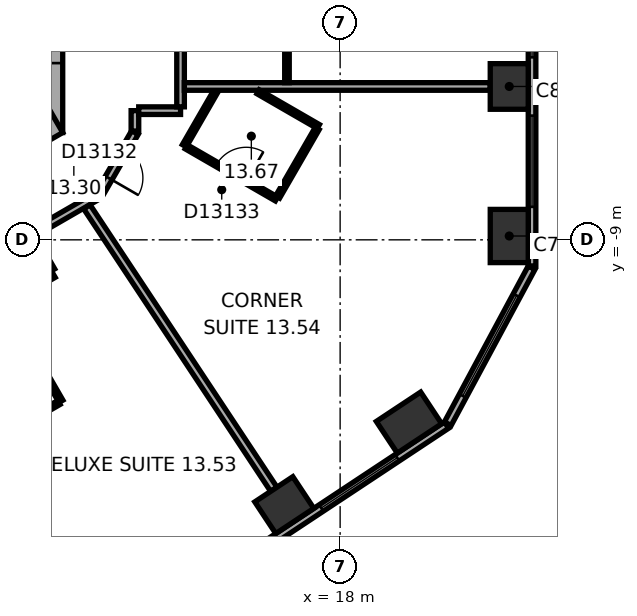
"""IFC4 building model, lengths in metres.
Left out: names, types, materials, properties, quantities, classifications, styles, units other than length and angle.
Written with IfcOpenShell. Run it as: python <this file> out.ifc"""

import sys

from ifc_helpers import new_model, si_unit, direction, frame, frame_2d, origin, origin_2d, place, context, subcontext, project, spatial, rectangle, extrude, element, fill, save


model = new_model("IFC4")
c1 = context("Model", 3, precision=1e-05, world=origin(), true_north=direction((0.0, 1.0)))
c2 = subcontext(c1, "Body", "Model", "MODEL_VIEW")
j1 = project(units=[si_unit("LENGTHUNIT", "METRE"), si_unit("PLANEANGLEUNIT", "RADIAN")], contexts=[c1])
p1 = place(None, origin())
s1 = spatial("IfcSite", under=j1, at=p1, CompositionType="ELEMENT")
p2 = place(p1, origin())
s2 = spatial("IfcBuilding", under=s1, at=p2, CompositionType="ELEMENT")
p3 = place(p2, frame((0.0, 0.0, 63.8)))
s3 = spatial("IfcBuildingStorey", under=s2, at=p3, CompositionType="ELEMENT", Elevation=63.8)
p4 = place(p3, frame((22.45, -8.899, 0.0), z_axis=(0.0, 0.0, 1.0), x_axis=(0.0, 1.0, 0.0)))
e1 = element("IfcColumn", 1, at=p4, inside=s3, PredefinedType="COLUMN", context=c2, shape_type="SweptSolid", body=[
    extrude(rectangle(XDim=1.4, YDim=1.0, at=origin_2d()), origin(), (0.0, 0.0, 1.0), 3.3),
])
for number, where, z_axis, x_axis in (
    (2, (22.45, -4.965, 0.0), (0.0, 0.0, 1.0), (0.0, 1.0, 0.0)),
    (3, (16.531, -15.981, 0.0), (0.0, 0.0, 1.0), (0.834, 0.552, 0.0)),
):
    element("IfcColumn", number, at=place(p3, frame(where, z_axis=z_axis, x_axis=x_axis)), inside=s3, PredefinedType="COLUMN", context=c2, shape_type="SweptSolid", body=[
        extrude(rectangle(XDim=1.2, YDim=1.0, at=origin_2d()), origin(), (0.0, 0.0, 1.0), 3.3),
    ])
p5 = place(p3, frame((19.812, -13.809, 0.0), z_axis=(0.0, 0.0, 1.0), x_axis=(0.833885822067, 0.551936985312, 0.0)))
e4 = element("IfcColumn", 4, at=p5, inside=s3, PredefinedType="COLUMN", context=c2, shape_type="SweptSolid", body=[
    extrude(rectangle(XDim=1.4, YDim=1.0, at=origin_2d()), origin(), (0.0, 0.0, 1.0), 3.3),
])
p6 = place(p3, frame((10.1, -6.177, 0.0), z_axis=(0.0, 0.0, 1.0), x_axis=(0.0, 1.0, 0.0)))
e5 = element("IfcWall", 5, at=p6, inside=s3, PredefinedType="SHEAR", context=c2, shape_type="SweptSolid", body=[
    extrude(rectangle(XDim=12.355, YDim=1.2, at=frame_2d((6.177, 0.0))), origin(), (0.0, 0.0, 1.0), 3.3),
])
p7 = place(p6, frame((6.378, 0.0, 0.0)))
e6 = element("IfcOpeningElement", 6, at=p7, cuts=e5, PredefinedType="OPENING", context=c2, shape_type="SweptSolid", body=[
    extrude(rectangle(XDim=1.5, YDim=2.1, at=frame_2d((0.75, 1.05))), frame((0.0, 0.61, 0.0), z_axis=(0.0, -1.0, 0.0), x_axis=(1.0, 0.0, 0.0)), (0.0, 0.0, 1.0), 1.22),
])
p8 = place(p6, frame((1.828, 0.0, 0.0)))
e7 = element("IfcOpeningElement", 7, at=p8, cuts=e5, PredefinedType="OPENING", context=c2, shape_type="SweptSolid", body=[
    extrude(rectangle(XDim=1.1, YDim=2.1, at=frame_2d((0.55, 1.05))), frame((0.0, 0.61, 0.0), z_axis=(0.0, -1.0, 0.0), x_axis=(1.0, 0.0, 0.0)), (0.0, 0.0, 1.0), 1.22),
])
p9 = place(p6, frame((4.427, 0.0, 0.0)))
e8 = element("IfcOpeningElement", 8, at=p9, cuts=e5, PredefinedType="OPENING", context=c2, shape_type="SweptSolid", body=[
    extrude(rectangle(XDim=1.1, YDim=2.1, at=frame_2d((0.55, 1.05))), frame((0.0, 0.61, 0.0), z_axis=(0.0, -1.0, 0.0), x_axis=(1.0, 0.0, 0.0)), (0.0, 0.0, 1.0), 1.22),
])
p10 = place(p3, frame((-0.3, -11.836, 0.0), z_axis=(0.0, 0.0, 1.0), x_axis=(0.866021384402, 0.500006961711, 0.0)))
e9 = element("IfcWall", 9, at=p10, inside=s3, PredefinedType="SHEAR", context=c2, shape_type="SweptSolid", body=[
    extrude(rectangle(XDim=12.355, YDim=1.2, at=frame_2d((6.178, 0.0))), origin(), (0.0, 0.0, 1.0), 3.3),
])
p11 = place(p10, frame((4.128, 0.0, 0.0)))
e10 = element("IfcOpeningElement", 10, at=p11, cuts=e9, PredefinedType="OPENING", context=c2, shape_type="SweptSolid", body=[
    extrude(rectangle(XDim=0.9, YDim=2.1, at=frame_2d((0.45, 1.05))), frame((0.0, 0.61, 0.0), z_axis=(0.0, -1.0, 0.0), x_axis=(1.0, 0.0, 0.0)), (0.0, 0.0, 1.0), 1.22),
])
p12 = place(p10, frame((7.928, 0.0, 0.0)))
e11 = element("IfcOpeningElement", 11, at=p12, cuts=e9, PredefinedType="OPENING", context=c2, shape_type="SweptSolid", body=[
    extrude(rectangle(XDim=1.1, YDim=2.1, at=frame_2d((0.55, 1.05))), frame((0.0, 0.61, 0.0), z_axis=(0.0, -1.0, 0.0), x_axis=(1.0, 0.0, 0.0)), (0.0, 0.0, 1.0), 1.22),
])
p13 = place(p3, frame((23.05, -9.687, 0.0), z_axis=(0.0, 0.0, 1.0), x_axis=(0.0, 1.0, 0.0)))
e12 = element("IfcWall", 12, at=p13, inside=s3, PredefinedType="STANDARD", context=c2, shape_type="SweptSolid", body=[
    extrude(rectangle(XDim=21.246, YDim=0.2, at=frame_2d((10.623, 0.0))), origin(), (0.0, 0.0, 1.0), 3.3),
])
p14 = place(p13, frame((1.555, 0.0, 0.8)))
e13 = element("IfcOpeningElement", 13, at=p14, cuts=e12, PredefinedType="OPENING", context=c2, shape_type="SweptSolid", body=[
    extrude(rectangle(XDim=2.4, YDim=1.7, at=frame_2d((1.2, 0.85))), frame((0.0, 0.11, 0.0), z_axis=(0.0, -1.0, 0.0), x_axis=(1.0, 0.0, 0.0)), (0.0, 0.0, 1.0), 0.22),
])
p15 = place(p13, frame((5.489, 0.0, 0.8)))
e14 = element("IfcOpeningElement", 14, at=p15, cuts=e12, PredefinedType="OPENING", context=c2, shape_type="SweptSolid", body=[
    extrude(rectangle(XDim=2.4, YDim=1.7, at=frame_2d((1.2, 0.85))), frame((0.0, 0.11, 0.0), z_axis=(0.0, -1.0, 0.0), x_axis=(1.0, 0.0, 0.0)), (0.0, 0.0, 1.0), 0.22),
])
p16 = place(p13, frame((9.424, 0.0, 0.8)))
e15 = element("IfcOpeningElement", 15, at=p16, cuts=e12, PredefinedType="OPENING", context=c2, shape_type="SweptSolid", body=[
    extrude(rectangle(XDim=2.4, YDim=1.7, at=frame_2d((1.2, 0.85))), frame((0.0, 0.11, 0.0), z_axis=(0.0, -1.0, 0.0), x_axis=(1.0, 0.0, 0.0)), (0.0, 0.0, 1.0), 0.22),
])
p17 = place(p13, frame((13.358, 0.0, 0.8)))
e16 = element("IfcOpeningElement", 16, at=p17, cuts=e12, PredefinedType="OPENING", context=c2, shape_type="SweptSolid", body=[
    extrude(rectangle(XDim=2.4, YDim=1.7, at=frame_2d((1.2, 0.85))), frame((0.0, 0.11, 0.0), z_axis=(0.0, -1.0, 0.0), x_axis=(1.0, 0.0, 0.0)), (0.0, 0.0, 1.0), 0.22),
])
p18 = place(p13, frame((17.293, 0.0, 0.8)))
e17 = element("IfcOpeningElement", 17, at=p18, cuts=e12, PredefinedType="OPENING", context=c2, shape_type="SweptSolid", body=[
    extrude(rectangle(XDim=2.4, YDim=1.7, at=frame_2d((1.2, 0.85))), frame((0.0, 0.11, 0.0), z_axis=(0.0, -1.0, 0.0), x_axis=(1.0, 0.0, 0.0)), (0.0, 0.0, 1.0), 0.22),
])
p19 = place(p3, frame((3.083, -25.601, 0.0), z_axis=(0.0, 0.0, 1.0), x_axis=(0.833884295743, 0.551939291329, 0.0)))
e18 = element("IfcWall", 18, at=p19, inside=s3, PredefinedType="STANDARD", context=c2, shape_type="SweptSolid", body=[
    extrude(rectangle(XDim=21.246, YDim=0.2, at=frame_2d((10.623, 0.0))), origin(), (0.0, 0.0, 1.0), 3.3),
])
p20 = place(p19, frame((1.553, 0.0, 0.8)))
e19 = element("IfcOpeningElement", 19, at=p20, cuts=e18, PredefinedType="OPENING", context=c2, shape_type="SweptSolid", body=[
    extrude(rectangle(XDim=2.4, YDim=1.7, at=frame_2d((1.2, 0.85))), frame((0.0, 0.11, 0.0), z_axis=(0.0, -1.0, 0.0), x_axis=(1.0, 0.0, 0.0)), (0.0, 0.0, 1.0), 0.22),
])
p21 = place(p19, frame((5.488, 0.0, 0.8)))
e20 = element("IfcOpeningElement", 20, at=p21, cuts=e18, PredefinedType="OPENING", context=c2, shape_type="SweptSolid", body=[
    extrude(rectangle(XDim=2.4, YDim=1.7, at=frame_2d((1.2, 0.85))), frame((0.0, 0.11, 0.0), z_axis=(0.0, -1.0, 0.0), x_axis=(1.0, 0.0, 0.0)), (0.0, 0.0, 1.0), 0.22),
])
p22 = place(p19, frame((9.422, 0.0, 0.8)))
e21 = element("IfcOpeningElement", 21, at=p22, cuts=e18, PredefinedType="OPENING", context=c2, shape_type="SweptSolid", body=[
    extrude(rectangle(XDim=2.4, YDim=1.7, at=frame_2d((1.2, 0.85))), frame((0.0, 0.11, 0.0), z_axis=(0.0, -1.0, 0.0), x_axis=(1.0, 0.0, 0.0)), (0.0, 0.0, 1.0), 0.22),
])
p23 = place(p19, frame((13.357, 0.0, 0.8)))
e22 = element("IfcOpeningElement", 22, at=p23, cuts=e18, PredefinedType="OPENING", context=c2, shape_type="SweptSolid", body=[
    extrude(rectangle(XDim=2.4, YDim=1.7, at=frame_2d((1.2, 0.85))), frame((0.0, 0.11, 0.0), z_axis=(0.0, -1.0, 0.0), x_axis=(1.0, 0.0, 0.0)), (0.0, 0.0, 1.0), 0.22),
])
p24 = place(p19, frame((17.291, 0.0, 0.8)))
e23 = element("IfcOpeningElement", 23, at=p24, cuts=e18, PredefinedType="OPENING", context=c2, shape_type="SweptSolid", body=[
    extrude(rectangle(XDim=2.4, YDim=1.7, at=frame_2d((1.2, 0.85))), frame((0.0, 0.11, 0.0), z_axis=(0.0, -1.0, 0.0), x_axis=(1.0, 0.0, 0.0)), (0.0, 0.0, 1.0), 0.22),
])
p25 = place(p3, frame((20.833, -13.839, 0.0), z_axis=(0.0, 0.0, 1.0), x_axis=(0.473321668581, 0.880889662813, 0.0)))
e24 = element("IfcWall", 24, at=p25, inside=s3, PredefinedType="STANDARD", context=c2, shape_type="SweptSolid", body=[
    extrude(rectangle(XDim=4.66, YDim=0.2, at=frame_2d((2.33, 0.0))), origin(), (0.0, 0.0, 1.0), 3.3),
])
p26 = place(p25, frame((0.83, 0.0, 0.8)))
e25 = element("IfcOpeningElement", 25, at=p26, cuts=e24, PredefinedType="OPENING", context=c2, shape_type="SweptSolid", body=[
    extrude(rectangle(XDim=3.0, YDim=1.7, at=frame_2d((1.5, 0.85))), frame((0.0, 0.11, 0.0), z_axis=(0.0, -1.0, 0.0), x_axis=(1.0, 0.0, 0.0)), (0.0, 0.0, 1.0), 0.22),
])
p27 = place(p3, frame((7.385, -11.673, 0.0), z_axis=(0.0, 0.0, 1.0), x_axis=(0.866037524642, 0.499979005472, 0.0)))
e26 = element("IfcWall", 26, at=p27, inside=s3, PredefinedType="PARTITIONING", context=c2, shape_type="SweptSolid", body=[
    extrude(rectangle(XDim=3.542, YDim=0.2, at=frame_2d((1.771, 0.0))), origin(), (0.0, 0.0, 1.0), 3.05),
])
p28 = place(p3, frame((9.203, -10.738, 0.0), z_axis=(0.0, 0.0, 1.0), x_axis=(0.50005036918, -0.865996321171, 0.0)))
e27 = element("IfcWall", 27, at=p28, inside=s3, PredefinedType="PARTITIONING", context=c2, shape_type="SweptSolid", body=[
    extrude(rectangle(XDim=2.9, YDim=0.12, at=frame_2d((1.45, 0.0))), origin(), (0.0, 0.0, 1.0), 3.05),
])
p29 = place(p3, frame((9.852, -8.861, 0.0), z_axis=(0.0, 0.0, 1.0), x_axis=(0.866013291437, 0.500020978615, 0.0)))
e28 = element("IfcWall", 28, at=p29, inside=s3, PredefinedType="PARTITIONING", context=c2, shape_type="SweptSolid", body=[
    extrude(rectangle(XDim=2.077, YDim=0.2, at=frame_2d((1.038, 0.0))), origin(), (0.0, 0.0, 1.0), 3.05),
])
p30 = place(p3, frame((10.402, -9.815, 0.0), z_axis=(0.0, 0.0, 1.0), x_axis=(-0.499968756647, 0.866043441391, 0.0)))
e29 = element("IfcWall", 29, at=p30, inside=s3, PredefinedType="PARTITIONING", context=c2, shape_type="SweptSolid", body=[
    extrude(rectangle(XDim=1.001, YDim=0.2, at=frame_2d((0.5, 0.0))), origin(), (0.0, 0.0, 1.0), 3.05),
])
p31 = place(p3, frame((10.601, -13.28, 0.0), z_axis=(0.0, 0.0, 1.0), x_axis=(-0.866044057189, -0.499967689963, 0.0)))
e30 = element("IfcWall", 30, at=p31, inside=s3, PredefinedType="PARTITIONING", context=c2, shape_type="SweptSolid", body=[
    extrude(rectangle(XDim=1.982, YDim=0.12, at=frame_2d((0.991, 0.0))), origin(), (0.0, 0.0, 1.0), 3.05),
])
p32 = place(p3, frame((11.67, -7.788, 0.0), z_axis=(0.0, 0.0, 1.0), x_axis=(0.500063286585, 0.865988862174, 0.0)))
e31 = element("IfcWall", 31, at=p32, inside=s3, PredefinedType="PARTITIONING", context=c2, shape_type="SweptSolid", body=[
    extrude(rectangle(XDim=1.86, YDim=0.2, at=frame_2d((0.93, 0.0))), origin(), (0.0, 0.0, 1.0), 3.05),
])
p33 = place(p32, frame((0.48, 0.0, 0.0)))
e32 = element("IfcOpeningElement", 32, at=p33, cuts=e31, PredefinedType="OPENING", context=c2, shape_type="SweptSolid", body=[
    extrude(rectangle(XDim=0.9, YDim=2.1, at=frame_2d((0.45, 1.05))), frame((0.0, 0.11, 0.0), z_axis=(0.0, -1.0, 0.0), x_axis=(1.0, 0.0, 0.0)), (0.0, 0.0, 1.0), 0.22),
])
p34 = place(p3, frame((12.6, -6.138, 0.0), z_axis=(0.0, 0.0, 1.0), x_axis=(0.0, 1.0, 0.0)))
e33 = element("IfcWall", 33, at=p34, inside=s3, PredefinedType="PARTITIONING", context=c2, shape_type="SweptSolid", body=[
    extrude(rectangle(XDim=0.537, YDim=0.2, at=frame_2d((0.268, 0.0))), origin(), (0.0, 0.0, 1.0), 3.05),
])
p35 = place(p3, frame((12.7, -5.601, 0.0), z_axis=(0.0, 0.0, 1.0), x_axis=(1.0, 0.0, 0.0)))
e34 = element("IfcWall", 34, at=p35, inside=s3, PredefinedType="PARTITIONING", context=c2, shape_type="SweptSolid", body=[
    extrude(rectangle(XDim=1.101, YDim=0.2, at=frame_2d((0.551, 0.0))), origin(), (0.0, 0.0, 1.0), 3.05),
])
p36 = place(p3, frame((13.801, -5.501, 0.0), z_axis=(0.0, 0.0, 1.0), x_axis=(0.0, 1.0, 0.0)))
e35 = element("IfcWall", 35, at=p36, inside=s3, PredefinedType="PARTITIONING", context=c2, shape_type="SweptSolid", body=[
    extrude(rectangle(XDim=5.702, YDim=0.2, at=frame_2d((2.851, 0.0))), origin(), (0.0, 0.0, 1.0), 3.05),
])
p37 = place(p3, frame((13.901, -6.524, 0.0), z_axis=(0.0, 0.0, 1.0), x_axis=(0.499964162598, 0.86604609353, 0.0)))
e36 = element("IfcWall", 36, at=p37, inside=s3, PredefinedType="PARTITIONING", context=c2, shape_type="SweptSolid", body=[
    extrude(rectangle(XDim=1.661, YDim=0.12, at=frame_2d((0.831, 0.0))), origin(), (0.0, 0.0, 1.0), 3.05),
])
p38 = place(p3, frame((13.901, -4.965, 0.0), z_axis=(0.0, 0.0, 1.0), x_axis=(1.0, 0.0, 0.0)))
e37 = element("IfcWall", 37, at=p38, inside=s3, PredefinedType="PARTITIONING", context=c2, shape_type="SweptSolid", body=[
    extrude(rectangle(XDim=8.049, YDim=0.2, at=frame_2d((4.024, 0.0))), origin(), (0.0, 0.0, 1.0), 3.05),
])
p39 = place(p3, frame((15.841, -5.104, 0.0), z_axis=(0.0, 0.0, 1.0), x_axis=(0.866025591402, -0.499999675036, 0.0)))
e38 = element("IfcWall", 38, at=p39, inside=s3, PredefinedType="PARTITIONING", context=c2, shape_type="SweptSolid", body=[
    extrude(rectangle(XDim=1.83, YDim=0.12, at=frame_2d((0.915, 0.0))), origin(), (0.0, 0.0, 1.0), 3.05),
])
p40 = place(p3, frame((16.255, -15.564, 0.0), z_axis=(0.0, 0.0, 1.0), x_axis=(-0.55192208744, 0.833895682562, 0.0)))
e39 = element("IfcWall", 39, at=p40, inside=s3, PredefinedType="PARTITIONING", context=c2, shape_type="SweptSolid", body=[
    extrude(rectangle(XDim=8.913, YDim=0.2, at=frame_2d((4.457, 0.0))), origin(), (0.0, 0.0, 1.0), 2.6),
])
p41 = place(p3, frame((16.326, -7.925, 0.0), z_axis=(0.0, 0.0, 1.0), x_axis=(-0.865997131366, 0.500048966069, 0.0)))
e40 = element("IfcWall", 40, at=p41, inside=s3, PredefinedType="PARTITIONING", context=c2, shape_type="SweptSolid", body=[
    extrude(rectangle(XDim=2.74, YDim=0.12, at=frame_2d((1.37, 0.0))), origin(), (0.0, 0.0, 1.0), 3.05),
])
p42 = place(p41, frame((0.92, 0.0, 0.0)))
e41 = element("IfcOpeningElement", 41, at=p42, cuts=e40, PredefinedType="OPENING", context=c2, shape_type="SweptSolid", body=[
    extrude(rectangle(XDim=0.9, YDim=2.1, at=frame_2d((0.45, 1.05))), frame((0.0, 0.07, 0.0), z_axis=(0.0, -1.0, 0.0), x_axis=(1.0, 0.0, 0.0)), (0.0, 0.0, 1.0), 0.14),
])
p43 = place(p3, frame((16.601, -2.425, 0.0), z_axis=(0.0, 0.0, 1.0), x_axis=(0.0, -1.0, 0.0)))
e42 = element("IfcWall", 42, at=p43, inside=s3, PredefinedType="PARTITIONING", context=c2, shape_type="SweptSolid", body=[
    extrude(rectangle(XDim=2.44, YDim=0.12, at=frame_2d((1.22, 0.0))), origin(), (0.0, 0.0, 1.0), 3.05),
])
p44 = place(p3, frame((17.396, -6.071, 0.0), z_axis=(0.0, 0.0, 1.0), x_axis=(-0.500027264788, -0.866009661879, 0.0)))
e43 = element("IfcWall", 43, at=p44, inside=s3, PredefinedType="PARTITIONING", context=c2, shape_type="SweptSolid", body=[
    extrude(rectangle(XDim=2.08, YDim=0.12, at=frame_2d((1.04, 0.0))), origin(), (0.0, 0.0, 1.0), 3.05),
])
p45 = place(p14, origin())
e44 = element("IfcWindow", 44, at=p45, inside=s3, PartitioningType="SINGLE_PANEL", PredefinedType="WINDOW", context=c2, shape_type="SweptSolid", body=[
    extrude(rectangle(XDim=2.4, YDim=1.7, at=frame_2d((1.2, 0.85))), frame((0.0, 0.03, 0.0), z_axis=(0.0, -1.0, 0.0), x_axis=(1.0, 0.0, 0.0)), (0.0, 0.0, 1.0), 0.06),
])
fill(e13, e44)
p46 = place(p15, origin())
e45 = element("IfcWindow", 45, at=p46, inside=s3, PartitioningType="SINGLE_PANEL", PredefinedType="WINDOW", context=c2, shape_type="SweptSolid", body=[
    extrude(rectangle(XDim=2.4, YDim=1.7, at=frame_2d((1.2, 0.85))), frame((0.0, 0.03, 0.0), z_axis=(0.0, -1.0, 0.0), x_axis=(1.0, 0.0, 0.0)), (0.0, 0.0, 1.0), 0.06),
])
fill(e14, e45)
p47 = place(p24, origin())
e46 = element("IfcWindow", 46, at=p47, inside=s3, PartitioningType="SINGLE_PANEL", PredefinedType="WINDOW", context=c2, shape_type="SweptSolid", body=[
    extrude(rectangle(XDim=2.4, YDim=1.7, at=frame_2d((1.2, 0.85))), frame((0.0, 0.03, 0.0), z_axis=(0.0, -1.0, 0.0), x_axis=(1.0, 0.0, 0.0)), (0.0, 0.0, 1.0), 0.06),
])
fill(e23, e46)
p48 = place(p26, origin())
e47 = element("IfcWindow", 47, at=p48, inside=s3, PartitioningType="SINGLE_PANEL", PredefinedType="WINDOW", context=c2, shape_type="SweptSolid", body=[
    extrude(rectangle(XDim=3.0, YDim=1.7, at=frame_2d((1.5, 0.85))), frame((0.0, 0.03, 0.0), z_axis=(0.0, -1.0, 0.0), x_axis=(1.0, 0.0, 0.0)), (0.0, 0.0, 1.0), 0.06),
])
fill(e25, e47)
p49 = place(p33, origin())
e48 = element("IfcDoor", 48, at=p49, inside=s3, OperationType="SINGLE_SWING_LEFT", PredefinedType="DOOR", context=c2, shape_type="SweptSolid", body=[
    extrude(rectangle(XDim=0.9, YDim=2.1, at=frame_2d((0.45, 1.05))), frame((0.0, 0.025, 0.0), z_axis=(0.0, -1.0, 0.0), x_axis=(1.0, 0.0, 0.0)), (0.0, 0.0, 1.0), 0.05),
])
fill(e32, e48)
p50 = place(p42, origin())
e49 = element("IfcDoor", 49, at=p50, inside=s3, OperationType="SINGLE_SWING_LEFT", PredefinedType="DOOR", context=c2, shape_type="SweptSolid", body=[
    extrude(rectangle(XDim=0.9, YDim=2.1, at=frame_2d((0.45, 1.05))), frame((0.0, 0.025, 0.0), z_axis=(0.0, -1.0, 0.0), x_axis=(1.0, 0.0, 0.0)), (0.0, 0.0, 1.0), 0.05),
])
fill(e41, e49)
save(model, sys.argv[1])
